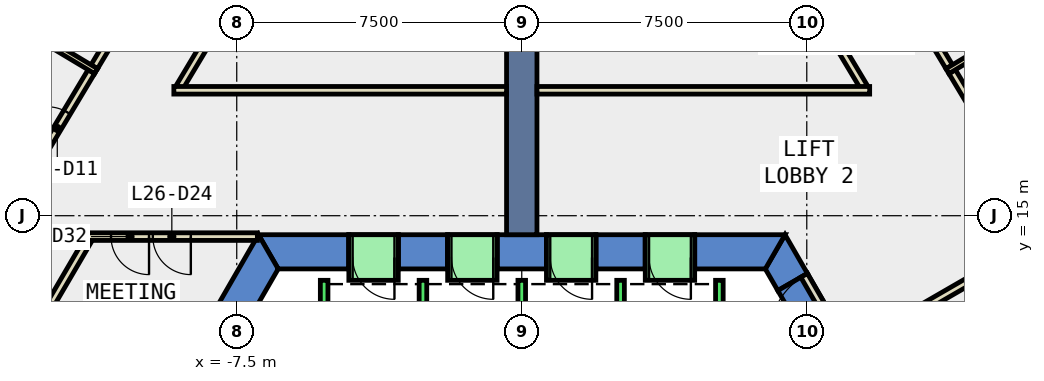
"""IFC4 building model, lengths in metres.
Left out: names, types, materials, properties, quantities, classifications, styles, units other than length and angle.
Written with IfcOpenShell. Run it as: python <this file> out.ifc"""

import sys

from ifc_helpers import new_model, si_unit, direction, frame, frame_2d, origin, place, context, subcontext, project, spatial, polyline, rectangle, outline, extrude, element, fill, save


model = new_model("IFC4")
c1 = context("Model", 3, precision=1e-05, world=origin(), true_north=direction((0.0, 1.0)))
c2 = subcontext(c1, "Body", "Model", "MODEL_VIEW")
j1 = project(units=[si_unit("LENGTHUNIT", "METRE"), si_unit("PLANEANGLEUNIT", "RADIAN")], contexts=[c1])
p1 = place(None, origin())
s1 = spatial("IfcSite", under=j1, at=p1, CompositionType="ELEMENT")
p2 = place(p1, origin())
s2 = spatial("IfcBuilding", under=s1, at=p2, CompositionType="ELEMENT")
p3 = place(p2, frame((0.0, 0.0, 120.2)))
s3 = spatial("IfcBuildingStorey", under=s2, at=p3, CompositionType="ELEMENT", Elevation=120.2)
p4 = place(p3, frame((0.0, 0.0, -0.4)))
e1 = element("IfcWall", 1, at=p4, inside=s3, PredefinedType="SHEAR", context=c2, shape_type="SweptSolid", body=[
    extrude(outline(polyline([(6.738, 13.03), (7.517, 13.48), (6.928, 14.5), (6.409, 13.6), (6.738, 13.03)])), origin(), (0.0, 0.0, 1.0), 4.2),
])
p5 = place(p3, frame((0.0, 0.0, 3.6)))
e2 = element("IfcWall", 2, at=p5, inside=s3, PredefinedType="SHEAR", context=c2, shape_type="SweptSolid", body=[
    extrude(outline(polyline([(7.517, 13.48), (6.738, 13.03), (7.738, 11.298), (8.517, 11.748), (7.517, 13.48)])), origin(), (0.0, 0.0, 1.0), 0.2),
])
p6 = place(p3, frame((0.0, 0.0, -0.4)))
e3 = element("IfcWall", 3, at=p6, inside=s3, PredefinedType="SHEAR", context=c2, shape_type="SweptSolid", body=[
    extrude(outline(polyline([(4.55, 14.5), (4.55, 13.6), (6.409, 13.6), (6.928, 14.5), (4.55, 14.5)])), origin(), (0.0, 0.0, 1.0), 4.2),
])
p7 = place(p3, frame((0.0, 0.0, -0.4)))
e4 = element("IfcWall", 4, at=p7, inside=s3, PredefinedType="SHEAR", context=c2, shape_type="SweptSolid", body=[
    extrude(outline(polyline([(1.95, 14.5), (1.95, 13.6), (3.25, 13.6), (3.25, 14.5), (1.95, 14.5)])), origin(), (0.0, 0.0, 1.0), 4.2),
])
p8 = place(p3, frame((0.0, 0.0, -0.4)))
e5 = element("IfcWall", 5, at=p8, inside=s3, PredefinedType="SHEAR", context=c2, shape_type="SweptSolid", body=[
    extrude(outline(polyline([(-0.65, 14.5), (-0.65, 13.6), (0.65, 13.6), (0.65, 14.5), (-0.65, 14.5)])), origin(), (0.0, 0.0, 1.0), 4.2),
])
p9 = place(p3, frame((0.0, 0.0, -0.4)))
e6 = element("IfcWall", 6, at=p9, inside=s3, PredefinedType="SHEAR", context=c2, shape_type="SweptSolid", body=[
    extrude(outline(polyline([(-3.25, 14.5), (-3.25, 13.6), (-1.95, 13.6), (-1.95, 14.5), (-3.25, 14.5)])), origin(), (0.0, 0.0, 1.0), 4.2),
])
p10 = place(p3, frame((0.0, 0.0, -0.4)))
e7 = element("IfcWall", 7, at=p10, inside=s3, PredefinedType="SHEAR", context=c2, shape_type="SweptSolid", body=[
    extrude(outline(polyline([(-4.55, 13.6), (-4.55, 14.5), (-6.928, 14.5), (-6.409, 13.6), (-4.55, 13.6)])), origin(), (0.0, 0.0, 1.0), 4.2),
])
p11 = place(p3, frame((0.0, 0.0, 3.6)))
e8 = element("IfcWall", 8, at=p11, inside=s3, PredefinedType="SHEAR", context=c2, shape_type="SweptSolid", body=[
    extrude(outline(polyline([(3.25, 14.5), (3.25, 13.6), (4.55, 13.6), (4.55, 14.5), (3.25, 14.5)])), origin(), (0.0, 0.0, 1.0), 0.2),
])
p12 = place(p3, frame((0.0, 0.0, 3.6)))
e9 = element("IfcWall", 9, at=p12, inside=s3, PredefinedType="SHEAR", context=c2, shape_type="SweptSolid", body=[
    extrude(outline(polyline([(0.65, 14.5), (0.65, 13.6), (1.95, 13.6), (1.95, 14.5), (0.65, 14.5)])), origin(), (0.0, 0.0, 1.0), 0.2),
])
p13 = place(p3, frame((0.0, 0.0, 3.6)))
e10 = element("IfcWall", 10, at=p13, inside=s3, PredefinedType="SHEAR", context=c2, shape_type="SweptSolid", body=[
    extrude(outline(polyline([(-1.95, 14.5), (-1.95, 13.6), (-0.65, 13.6), (-0.65, 14.5), (-1.95, 14.5)])), origin(), (0.0, 0.0, 1.0), 0.2),
])
p14 = place(p3, frame((0.0, 0.0, 3.6)))
e11 = element("IfcWall", 11, at=p14, inside=s3, PredefinedType="SHEAR", context=c2, shape_type="SweptSolid", body=[
    extrude(outline(polyline([(-4.55, 14.5), (-4.55, 13.6), (-3.25, 13.6), (-3.25, 14.5), (-4.55, 14.5)])), origin(), (0.0, 0.0, 1.0), 0.2),
])
p15 = place(p3, frame((0.0, 0.0, -0.4)))
e12 = element("IfcWall", 12, at=p15, inside=s3, PredefinedType="SHEAR", context=c2, shape_type="SweptSolid", body=[
    extrude(outline(polyline([(-12.267, 5.252), (-11.488, 4.802), (-6.409, 13.6), (-6.928, 14.5), (-12.267, 5.252)])), origin(), (0.0, 0.0, 1.0), 4.2),
])
p16 = place(p3, frame((0.0, 14.5, -0.4), z_axis=(0.0, 0.0, 1.0), x_axis=(0.0, 1.0, 0.0)))
e13 = element("IfcWall", 13, at=p16, inside=s3, PredefinedType="SHEAR", context=c2, shape_type="SweptSolid", body=[
    extrude(rectangle(XDim=9.0, YDim=0.8, at=frame_2d((4.5, 0.0))), origin(), (0.0, 0.0, 1.0), 4.2),
])
p17 = place(p3, frame((-11.409, 14.364, 0.0), z_axis=(0.0, 0.0, 1.0), x_axis=(-0.504846343003, -0.863209227219, 0.0)))
e14 = element("IfcWall", 14, at=p17, inside=s3, PredefinedType="PARTITIONING", context=c2, shape_type="SweptSolid", body=[
    extrude(rectangle(XDim=2.785, YDim=0.2, at=frame_2d((1.393, 0.0))), origin(), (0.0, 0.0, 1.0), 3.8),
])
p18 = place(p3, frame((11.888, 13.348, 0.0), z_axis=(0.0, 0.0, 1.0), x_axis=(-0.865959227195, -0.500114603702, 0.0)))
e15 = element("IfcWall", 15, at=p18, inside=s3, PredefinedType="PARTITIONING", context=c2, shape_type="SweptSolid", body=[
    extrude(rectangle(XDim=3.269, YDim=0.2, at=frame_2d((1.635, 0.0))), origin(), (0.0, 0.0, 1.0), 3.8),
])
for number, where, z_axis, x_axis in (
    (16, (9.003, 18.386, 0.0), (0.0, 0.0, 1.0), (-0.514, 0.858, 0.0)),
    (17, (-7.576, 20.768, 0.0), (0.0, 0.0, 1.0), (-0.514, -0.858, 0.0)),
):
    element("IfcWall", number, at=place(p3, frame(where, z_axis=z_axis, x_axis=x_axis)), inside=s3, PredefinedType="PARTITIONING", context=c2, shape_type="SweptSolid", body=[
        extrude(rectangle(XDim=2.777, YDim=0.2, at=frame_2d((1.388, 0.0))), origin(), (0.0, 0.0, 1.0), 3.8),
    ])
p19 = place(p3, frame((11.326, 18.79, 0.0), z_axis=(0.0, 0.0, 1.0), x_axis=(0.514155958966, -0.857696712049, 0.0)))
e18 = element("IfcWall", 18, at=p19, inside=s3, PredefinedType="PARTITIONING", context=c2, shape_type="SweptSolid", body=[
    extrude(rectangle(XDim=3.487, YDim=0.2, at=frame_2d((1.744, 0.0))), origin(), (0.0, 0.0, 1.0), 3.8),
])
for number, where, z_axis, x_axis in (
    (19, (9.457, 21.909, 0.0), (0.0, 0.0, 1.0), (0.514, -0.858, 0.0)),
    (20, (-11.249, 18.918, 0.0), (0.0, 0.0, 1.0), (0.514, 0.858, 0.0)),
):
    element("IfcWall", number, at=place(p3, frame(where, z_axis=z_axis, x_axis=x_axis)), inside=s3, PredefinedType="PARTITIONING", context=c2, shape_type="SweptSolid", body=[
        extrude(rectangle(XDim=3.487, YDim=0.2, at=frame_2d((1.743, 0.0))), origin(), (0.0, 0.0, 1.0), 3.8),
    ])
p20 = place(p3, frame((-13.119, 15.799, 0.0), z_axis=(0.0, 0.0, 1.0), x_axis=(0.514155958966, 0.857696712049, 0.0)))
e21 = element("IfcWall", 21, at=p20, inside=s3, PredefinedType="PARTITIONING", context=c2, shape_type="SweptSolid", body=[
    extrude(rectangle(XDim=3.487, YDim=0.2, at=frame_2d((1.744, 0.0))), origin(), (0.0, 0.0, 1.0), 3.8),
])
p21 = place(p20, frame((1.244, 0.0, 0.0)))
e22 = element("IfcOpeningElement", 22, at=p21, cuts=e21, PredefinedType="OPENING", context=c2, shape_type="SweptSolid", body=[
    extrude(rectangle(XDim=1.0, YDim=2.1, at=frame_2d((0.5, 1.05))), frame((0.0, 0.11, 0.0), z_axis=(0.0, -1.0, 0.0), x_axis=(1.0, 0.0, 0.0)), (0.0, 0.0, 1.0), 0.22),
])
p22 = place(p3, frame((-6.957, 14.45, 0.0), z_axis=(0.0, 0.0, 1.0), x_axis=(-1.0, 0.0, 0.0)))
e23 = element("IfcWall", 23, at=p22, inside=s3, PredefinedType="PARTITIONING", context=c2, shape_type="SweptSolid", body=[
    extrude(rectangle(XDim=4.502, YDim=0.2, at=frame_2d((2.251, 0.0))), origin(), (0.0, 0.0, 1.0), 3.8),
])
p23 = place(p22, frame((1.751, 0.0, 0.0)))
e24 = element("IfcOpeningElement", 24, at=p23, cuts=e23, PredefinedType="OPENING", context=c2, shape_type="SweptSolid", body=[
    extrude(rectangle(XDim=1.0, YDim=2.1, at=frame_2d((0.5, 1.05))), frame((0.0, 0.11, 0.0), z_axis=(0.0, -1.0, 0.0), x_axis=(1.0, 0.0, 0.0)), (0.0, 0.0, 1.0), 0.22),
])
p24 = place(p22, frame((2.851, 0.0, 0.0)))
e25 = element("IfcOpeningElement", 25, at=p24, cuts=e23, PredefinedType="OPENING", context=c2, shape_type="SweptSolid", body=[
    extrude(rectangle(XDim=1.0, YDim=2.1, at=frame_2d((0.5, 1.05))), frame((0.0, 0.11, 0.0), z_axis=(0.0, -1.0, 0.0), x_axis=(1.0, 0.0, 0.0)), (0.0, 0.0, 1.0), 0.22),
])
for number, where, z_axis, x_axis in (
    (26, (0.4, 18.3, 0.0), (0.0, 0.0, 1.0), (1.0, 0.0, 0.0)),
    (27, (-9.155, 18.3, 0.0), (0.0, 0.0, 1.0), (1.0, 0.0, 0.0)),
):
    element("IfcWall", number, at=place(p3, frame(where, z_axis=z_axis, x_axis=x_axis)), inside=s3, PredefinedType="PARTITIONING", context=c2, shape_type="SweptSolid", body=[
        extrude(rectangle(XDim=8.755, YDim=0.2, at=frame_2d((4.377, 0.0))), origin(), (0.0, 0.0, 1.0), 3.8),
    ])
for number, where, z_axis, x_axis in (
    (28, (11.202, 18.803, 0.0), (0.0, 0.0, 1.0), (0.858, 0.514, 0.0)),
    (29, (-11.202, 18.803, 0.0), (0.0, 0.0, 1.0), (-0.858, 0.514, 0.0)),
):
    element("IfcWall", number, at=place(p3, frame(where, z_axis=z_axis, x_axis=x_axis)), inside=s3, PredefinedType="PARTITIONING", context=c2, shape_type="SweptSolid", body=[
        extrude(rectangle(XDim=7.7, YDim=0.15, at=frame_2d((3.85, 0.0))), origin(), (0.0, 0.0, 1.0), 3.8),
    ])
p25 = place(p3, frame((8.43, 11.698, 0.0), z_axis=(0.0, 0.0, 1.0), x_axis=(-0.50002537861, 0.866010750942, 0.0)))
e30 = element("IfcWall", 30, at=p25, inside=s3, PredefinedType="PARTITIONING", context=c2, shape_type="SweptSolid", body=[
    extrude(rectangle(XDim=2.0, YDim=0.2, at=frame_2d((1.0, 0.0))), origin(), (0.0, 0.0, 1.0), 2.4),
])
p26 = place(p25, frame((0.19, 0.0, 0.0)))
e31 = element("IfcOpeningElement", 31, at=p26, cuts=e30, PredefinedType="OPENING", context=c2, shape_type="SweptSolid", body=[
    extrude(rectangle(XDim=1.8, YDim=2.1, at=frame_2d((0.9, 1.05))), frame((0.0, 0.11, 0.0), z_axis=(0.0, -1.0, 0.0), x_axis=(1.0, 0.0, 0.0)), (0.0, 0.0, 1.0), 0.22),
])
for number, where, z_axis, x_axis in (
    (32, (5.2, 10.8, 0.0), (0.0, 0.0, 1.0), (0.0, 1.0, 0.0)),
    (33, (2.6, 10.8, 0.0), (0.0, 0.0, 1.0), (0.0, 1.0, 0.0)),
    (34, (0.0, 10.8, 0.0), (0.0, 0.0, 1.0), (0.0, 1.0, 0.0)),
    (35, (-2.6, 10.8, 0.0), (0.0, 0.0, 1.0), (0.0, 1.0, 0.0)),
    (36, (-5.2, 10.8, 0.0), (0.0, 0.0, 1.0), (0.0, 1.0, 0.0)),
):
    element("IfcWall", number, at=place(p3, frame(where, z_axis=z_axis, x_axis=x_axis)), inside=s3, PredefinedType="STANDARD", context=c2, shape_type="SweptSolid", body=[
        extrude(rectangle(XDim=2.5, YDim=0.2, at=frame_2d((1.25, 0.0))), origin(), (0.0, 0.0, 1.0), 3.8),
    ])
p27 = place(p3, frame((4.55, 13.9, 0.0), z_axis=(0.0, 0.0, 1.0), x_axis=(-1.0, 0.0, 0.0)))
e37 = element("IfcWall", 37, at=p27, inside=s3, PredefinedType="STANDARD", context=c2, shape_type="SweptSolid", body=[
    extrude(rectangle(XDim=1.3, YDim=1.2, at=frame_2d((0.65, 0.0))), origin(), (0.0, 0.0, 1.0), 2.4),
])
p28 = place(p27, frame((0.1, 0.0, 0.0)))
e38 = element("IfcOpeningElement", 38, at=p28, cuts=e37, PredefinedType="OPENING", context=c2, shape_type="SweptSolid", body=[
    extrude(rectangle(XDim=1.1, YDim=2.3, at=frame_2d((0.55, 1.15))), frame((0.0, 0.61, 0.0), z_axis=(0.0, -1.0, 0.0), x_axis=(1.0, 0.0, 0.0)), (0.0, 0.0, 1.0), 1.22),
])
p29 = place(p3, frame((1.95, 13.9, 0.0), z_axis=(0.0, 0.0, 1.0), x_axis=(-1.0, 0.0, 0.0)))
e39 = element("IfcWall", 39, at=p29, inside=s3, PredefinedType="STANDARD", context=c2, shape_type="SweptSolid", body=[
    extrude(rectangle(XDim=1.3, YDim=1.2, at=frame_2d((0.65, 0.0))), origin(), (0.0, 0.0, 1.0), 2.4),
])
p30 = place(p29, frame((0.1, 0.0, 0.0)))
e40 = element("IfcOpeningElement", 40, at=p30, cuts=e39, PredefinedType="OPENING", context=c2, shape_type="SweptSolid", body=[
    extrude(rectangle(XDim=1.1, YDim=2.3, at=frame_2d((0.55, 1.15))), frame((0.0, 0.61, 0.0), z_axis=(0.0, -1.0, 0.0), x_axis=(1.0, 0.0, 0.0)), (0.0, 0.0, 1.0), 1.22),
])
p31 = place(p3, frame((-0.65, 13.9, 0.0), z_axis=(0.0, 0.0, 1.0), x_axis=(-1.0, 0.0, 0.0)))
e41 = element("IfcWall", 41, at=p31, inside=s3, PredefinedType="STANDARD", context=c2, shape_type="SweptSolid", body=[
    extrude(rectangle(XDim=1.3, YDim=1.2, at=frame_2d((0.65, 0.0))), origin(), (0.0, 0.0, 1.0), 2.4),
])
p32 = place(p31, frame((0.1, 0.0, 0.0)))
e42 = element("IfcOpeningElement", 42, at=p32, cuts=e41, PredefinedType="OPENING", context=c2, shape_type="SweptSolid", body=[
    extrude(rectangle(XDim=1.1, YDim=2.3, at=frame_2d((0.55, 1.15))), frame((0.0, 0.61, 0.0), z_axis=(0.0, -1.0, 0.0), x_axis=(1.0, 0.0, 0.0)), (0.0, 0.0, 1.0), 1.22),
])
p33 = place(p3, frame((-3.25, 13.9, 0.0), z_axis=(0.0, 0.0, 1.0), x_axis=(-1.0, 0.0, 0.0)))
e43 = element("IfcWall", 43, at=p33, inside=s3, PredefinedType="STANDARD", context=c2, shape_type="SweptSolid", body=[
    extrude(rectangle(XDim=1.3, YDim=1.2, at=frame_2d((0.65, 0.0))), origin(), (0.0, 0.0, 1.0), 2.4),
])
p34 = place(p33, frame((0.1, 0.0, 0.0)))
e44 = element("IfcOpeningElement", 44, at=p34, cuts=e43, PredefinedType="OPENING", context=c2, shape_type="SweptSolid", body=[
    extrude(rectangle(XDim=1.1, YDim=2.3, at=frame_2d((0.55, 1.15))), frame((0.0, 0.61, 0.0), z_axis=(0.0, -1.0, 0.0), x_axis=(1.0, 0.0, 0.0)), (0.0, 0.0, 1.0), 1.22),
])
p35 = place(p21, origin())
e45 = element("IfcDoor", 45, at=p35, inside=s3, OperationType="SINGLE_SWING_LEFT", PredefinedType="DOOR", context=c2, shape_type="SweptSolid", body=[
    extrude(rectangle(XDim=1.0, YDim=2.1, at=frame_2d((0.5, 1.05))), frame((0.0, 0.025, 0.0), z_axis=(0.0, -1.0, 0.0), x_axis=(1.0, 0.0, 0.0)), (0.0, 0.0, 1.0), 0.05),
])
fill(e22, e45)
p36 = place(p23, origin())
e46 = element("IfcDoor", 46, at=p36, inside=s3, OperationType="SINGLE_SWING_LEFT", PredefinedType="DOOR", context=c2, shape_type="SweptSolid", body=[
    extrude(rectangle(XDim=1.0, YDim=2.1, at=frame_2d((0.5, 1.05))), frame((0.0, 0.025, 0.0), z_axis=(0.0, -1.0, 0.0), x_axis=(1.0, 0.0, 0.0)), (0.0, 0.0, 1.0), 0.05),
])
fill(e24, e46)
p37 = place(p24, origin())
e47 = element("IfcDoor", 47, at=p37, inside=s3, OperationType="SINGLE_SWING_RIGHT", PredefinedType="DOOR", context=c2, shape_type="SweptSolid", body=[
    extrude(rectangle(XDim=1.0, YDim=2.1, at=frame_2d((0.5, 1.05))), frame((0.0, 0.025, 0.0), z_axis=(0.0, -1.0, 0.0), x_axis=(1.0, 0.0, 0.0)), (0.0, 0.0, 1.0), 0.05),
])
fill(e25, e47)
p38 = place(p26, origin())
e48 = element("IfcDoor", 48, at=p38, inside=s3, OperationType="DOUBLE_DOOR_SINGLE_SWING", PredefinedType="DOOR", context=c2, shape_type="SweptSolid", body=[
    extrude(rectangle(XDim=1.8, YDim=2.1, at=frame_2d((0.9, 1.05))), frame((0.0, 0.025, 0.0), z_axis=(0.0, -1.0, 0.0), x_axis=(1.0, 0.0, 0.0)), (0.0, 0.0, 1.0), 0.05),
])
fill(e31, e48)
p39 = place(p28, origin())
e49 = element("IfcDoor", 49, at=p39, inside=s3, OperationType="SLIDING_TO_LEFT", PredefinedType="DOOR", context=c2, shape_type="SweptSolid", body=[
    extrude(rectangle(XDim=1.1, YDim=2.3, at=frame_2d((0.55, 1.15))), frame((0.0, 0.025, 0.0), z_axis=(0.0, -1.0, 0.0), x_axis=(1.0, 0.0, 0.0)), (0.0, 0.0, 1.0), 0.05),
])
fill(e38, e49)
p40 = place(p30, origin())
e50 = element("IfcDoor", 50, at=p40, inside=s3, OperationType="SLIDING_TO_LEFT", PredefinedType="DOOR", context=c2, shape_type="SweptSolid", body=[
    extrude(rectangle(XDim=1.1, YDim=2.3, at=frame_2d((0.55, 1.15))), frame((0.0, 0.025, 0.0), z_axis=(0.0, -1.0, 0.0), x_axis=(1.0, 0.0, 0.0)), (0.0, 0.0, 1.0), 0.05),
])
fill(e40, e50)
p41 = place(p32, origin())
e51 = element("IfcDoor", 51, at=p41, inside=s3, OperationType="SLIDING_TO_LEFT", PredefinedType="DOOR", context=c2, shape_type="SweptSolid", body=[
    extrude(rectangle(XDim=1.1, YDim=2.3, at=frame_2d((0.55, 1.15))), frame((0.0, 0.025, 0.0), z_axis=(0.0, -1.0, 0.0), x_axis=(1.0, 0.0, 0.0)), (0.0, 0.0, 1.0), 0.05),
])
fill(e42, e51)
p42 = place(p34, origin())
e52 = element("IfcDoor", 52, at=p42, inside=s3, OperationType="SLIDING_TO_LEFT", PredefinedType="DOOR", context=c2, shape_type="SweptSolid", body=[
    extrude(rectangle(XDim=1.1, YDim=2.3, at=frame_2d((0.55, 1.15))), frame((0.0, 0.025, 0.0), z_axis=(0.0, -1.0, 0.0), x_axis=(1.0, 0.0, 0.0)), (0.0, 0.0, 1.0), 0.05),
])
fill(e44, e52)
save(model, sys.argv[1])
